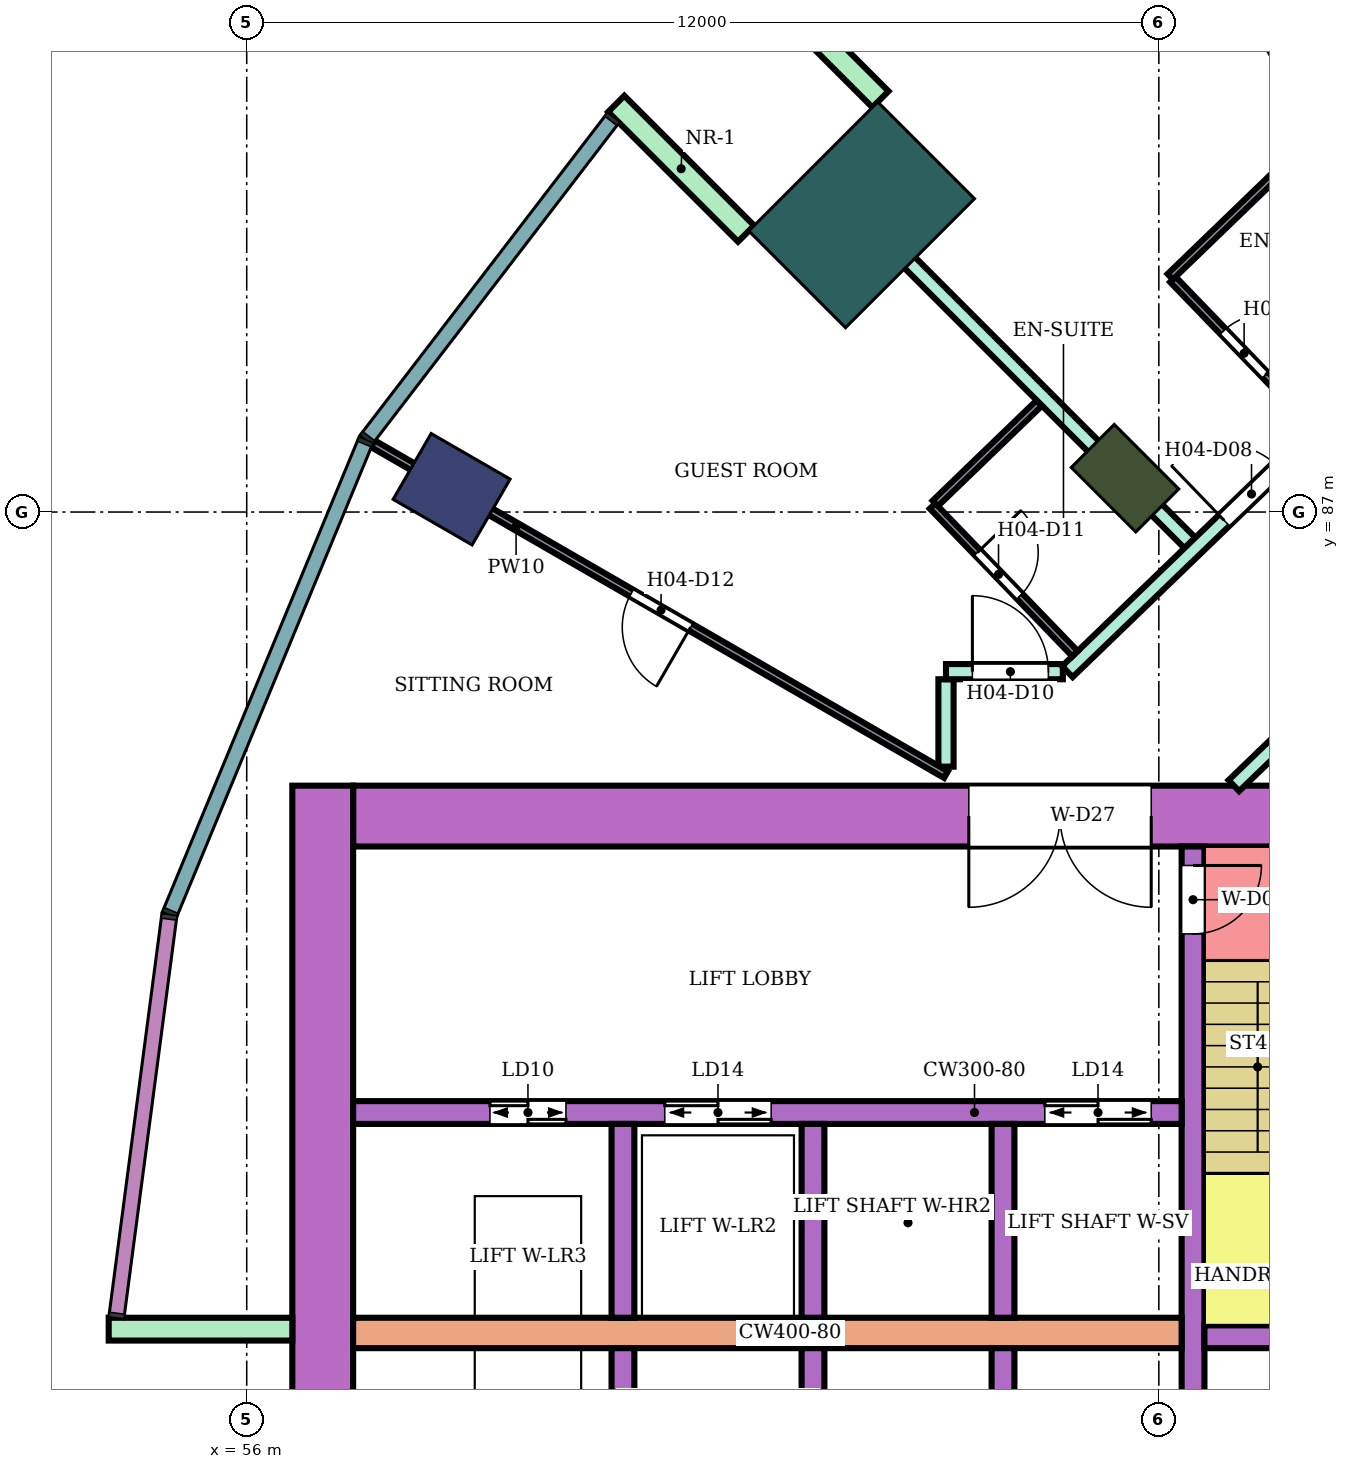
"""IFC4 building model, lengths in metres.
Left out: names, types, materials, properties, quantities, classifications, styles, units other than length and angle.
Written with IfcOpenShell. Run it as: python <this file> out.ifc"""

import sys

from ifc_helpers import new_model, si_unit, direction, frame, frame_2d, origin, origin_2d, place, context, subcontext, project, spatial, rectangle, extrude, element, fill, save


model = new_model("IFC4")
c1 = context("Model", 3, precision=1e-05, world=origin(), true_north=direction((0.0, 1.0)))
c2 = subcontext(c1, "Body", "Model", "MODEL_VIEW")
j1 = project(units=[si_unit("LENGTHUNIT", "METRE"), si_unit("PLANEANGLEUNIT", "RADIAN")], contexts=[c1])
p1 = place(None, origin())
s1 = spatial("IfcSite", under=j1, at=p1, CompositionType="ELEMENT")
p2 = place(p1, origin())
s2 = spatial("IfcBuilding", under=s1, at=p2, CompositionType="ELEMENT")
p3 = place(p2, frame((0.0, 0.0, 63.0)))
s3 = spatial("IfcBuildingStorey", under=s2, at=p3, CompositionType="ELEMENT", Elevation=63.0)
p4 = place(p3, frame((58.696, 87.3, 0.0), z_axis=(0.0, 0.0, 1.0), x_axis=(-0.866025403784, 0.5, 0.0)))
e1 = element("IfcColumn", 1, at=p4, inside=s3, PredefinedType="COLUMN", context=c2, shape_type="SweptSolid", body=[
    extrude(rectangle(XDim=1.2, YDim=1.0, at=origin_2d()), origin(), (0.0, 0.0, 1.0), 3.8),
])
p5 = place(p3, frame((67.555, 87.445, 0.0), z_axis=(0.0, 0.0, 1.0), x_axis=(-0.707106781187, 0.707106781187, 0.0)))
e2 = element("IfcColumn", 2, at=p5, inside=s3, PredefinedType="COLUMN", context=c2, shape_type="SweptSolid", body=[
    extrude(rectangle(XDim=1.2, YDim=0.8, at=origin_2d()), origin(), (0.0, 0.0, 1.0), 3.8),
])
p6 = place(p3, frame((64.09, 90.91, 0.0), z_axis=(0.0, 0.0, 1.0), x_axis=(-0.707106781187, 0.707106781187, 0.0)))
e3 = element("IfcColumn", 3, at=p6, inside=s3, PredefinedType="COLUMN", context=c2, shape_type="SweptSolid", body=[
    extrude(rectangle(XDim=1.8, YDim=2.4, at=origin_2d()), origin(), (0.0, 0.0, 1.0), 3.8),
])
p7 = place(p3, frame((72.1, 83.0, 0.0), z_axis=(0.0, 0.0, 1.0), x_axis=(-1.0, 0.0, 0.0)))
e4 = element("IfcWall", 4, at=p7, inside=s3, PredefinedType="SHEAR", context=c2, shape_type="SweptSolid", body=[
    extrude(rectangle(XDim=14.7, YDim=0.8, at=frame_2d((7.35, 0.0))), origin(), (0.0, 0.0, 1.0), 3.48),
])
p8 = place(p7, frame((4.2, 0.0, 0.0)))
e5 = element("IfcOpeningElement", 5, at=p8, cuts=e4, PredefinedType="OPENING", context=c2, shape_type="SweptSolid", body=[
    extrude(rectangle(XDim=2.4, YDim=2.4, at=frame_2d((1.2, 1.2))), frame((0.0, 0.41, 0.0), z_axis=(0.0, -1.0, 0.0), x_axis=(1.0, 0.0, 0.0)), (0.0, 0.0, 1.0), 0.82),
])
p9 = place(p3, frame((57.0, 83.4, 0.0), z_axis=(0.0, 0.0, 1.0), x_axis=(0.0, -1.0, 0.0)))
e6 = element("IfcWall", 6, at=p9, inside=s3, PredefinedType="SHEAR", context=c2, shape_type="SweptSolid", body=[
    extrude(rectangle(XDim=16.8, YDim=0.8, at=frame_2d((8.4, 0.0))), origin(), (0.0, 0.0, 1.0), 3.48),
])
p10 = place(p3, frame((68.45, 82.6, 0.0), z_axis=(0.0, 0.0, 1.0), x_axis=(0.0, -1.0, 0.0)))
e7 = element("IfcWall", 7, at=p10, inside=s3, PredefinedType="SHEAR", context=c2, shape_type="SweptSolid", body=[
    extrude(rectangle(XDim=7.6, YDim=0.3, at=frame_2d((3.8, 0.0))), origin(), (0.0, 0.0, 1.0), 3.48),
])
p11 = place(p10, frame((0.25, 0.0, 0.0)))
e8 = element("IfcOpeningElement", 8, at=p11, cuts=e7, PredefinedType="OPENING", context=c2, shape_type="SweptSolid", body=[
    extrude(rectangle(XDim=0.9, YDim=2.1, at=frame_2d((0.45, 1.05))), frame((0.0, 0.16, 0.0), z_axis=(0.0, -1.0, 0.0), x_axis=(1.0, 0.0, 0.0)), (0.0, 0.0, 1.0), 0.32),
])
p12 = place(p3, frame((71.65, 76.15, 0.0), z_axis=(0.0, 0.0, 1.0), x_axis=(-1.0, 0.0, 0.0)))
e9 = element("IfcWall", 9, at=p12, inside=s3, PredefinedType="SHEAR", context=c2, shape_type="SweptSolid", body=[
    extrude(rectangle(XDim=3.05, YDim=0.3, at=frame_2d((1.525, 0.0))), origin(), (0.0, 0.0, 1.0), 3.48),
])
p13 = place(p3, frame((68.3, 76.2, 0.0), z_axis=(0.0, 0.0, 1.0), x_axis=(-1.0, 0.0, 0.0)))
e10 = element("IfcWall", 10, at=p13, inside=s3, PredefinedType="SHEAR", context=c2, shape_type="SweptSolid", body=[
    extrude(rectangle(XDim=10.9, YDim=0.4, at=frame_2d((5.45, 0.0))), origin(), (0.0, 0.0, 1.0), 3.48),
])
p14 = place(p3, frame((68.3, 79.1, 0.0), z_axis=(0.0, 0.0, 1.0), x_axis=(-1.0, 0.0, 0.0)))
e11 = element("IfcWall", 11, at=p14, inside=s3, PredefinedType="SHEAR", context=c2, shape_type="SweptSolid", body=[
    extrude(rectangle(XDim=10.9, YDim=0.3, at=frame_2d((5.45, 0.0))), origin(), (0.0, 0.0, 1.0), 3.48),
])
p15 = place(p14, frame((0.4, 0.0, 0.0)))
e12 = element("IfcOpeningElement", 12, at=p15, cuts=e11, PredefinedType="OPENING", context=c2, shape_type="SweptSolid", body=[
    extrude(rectangle(XDim=1.4, YDim=2.1, at=frame_2d((0.7, 1.05))), frame((0.0, 0.16, 0.0), z_axis=(0.0, -1.0, 0.0), x_axis=(1.0, 0.0, 0.0)), (0.0, 0.0, 1.0), 0.32),
])
p16 = place(p14, frame((5.4, 0.0, 0.0)))
e13 = element("IfcOpeningElement", 13, at=p16, cuts=e11, PredefinedType="OPENING", context=c2, shape_type="SweptSolid", body=[
    extrude(rectangle(XDim=1.4, YDim=2.1, at=frame_2d((0.7, 1.05))), frame((0.0, 0.16, 0.0), z_axis=(0.0, -1.0, 0.0), x_axis=(1.0, 0.0, 0.0)), (0.0, 0.0, 1.0), 0.32),
])
p17 = place(p14, frame((8.1, 0.0, 0.0)))
e14 = element("IfcOpeningElement", 14, at=p17, cuts=e11, PredefinedType="OPENING", context=c2, shape_type="SweptSolid", body=[
    extrude(rectangle(XDim=1.0, YDim=2.1, at=frame_2d((0.5, 1.05))), frame((0.0, 0.16, 0.0), z_axis=(0.0, -1.0, 0.0), x_axis=(1.0, 0.0, 0.0)), (0.0, 0.0, 1.0), 0.32),
])
for number, where, z_axis, x_axis in (
    (15, (65.95, 76.0, 0.0), (0.0, 0.0, 1.0), (0.0, -1.0, 0.0)),
    (16, (63.45, 76.0, 0.0), (0.0, 0.0, 1.0), (0.0, -1.0, 0.0)),
    (17, (60.95, 76.0, 0.0), (0.0, 0.0, 1.0), (0.0, -1.0, 0.0)),
    (18, (65.95, 78.95, 0.0), (0.0, 0.0, 1.0), (0.0, -1.0, 0.0)),
    (19, (63.45, 78.95, 0.0), (0.0, 0.0, 1.0), (0.0, -1.0, 0.0)),
    (20, (60.95, 78.95, 0.0), (0.0, 0.0, 1.0), (0.0, -1.0, 0.0)),
):
    element("IfcWall", number, at=place(p3, frame(where, z_axis=z_axis, x_axis=x_axis)), inside=s3, PredefinedType="SHEAR", context=c2, shape_type="SweptSolid", body=[
        extrude(rectangle(XDim=2.55, YDim=0.3, at=frame_2d((1.275, 0.0))), origin(), (0.0, 0.0, 1.0), 3.48),
    ])
for number, where, z_axis, x_axis in (
    (21, (64.338, 92.43, 0.0), (0.0, 0.0, 1.0), (-0.707, 0.707, 0.0)),
    (22, (62.57, 90.662, 0.0), (0.0, 0.0, 1.0), (-0.707, 0.707, 0.0)),
    (23, (56.6, 76.25, 0.0), (0.0, 0.0, 1.0), (-1.0, 0.0, 0.0)),
):
    element("IfcWall", number, at=place(p3, frame(where, z_axis=z_axis, x_axis=x_axis)), inside=s3, PredefinedType="NOTDEFINED", context=c2, shape_type="SweptSolid", body=[
        extrude(rectangle(XDim=2.416, YDim=0.3, at=frame_2d((1.208, 0.0))), origin(), (0.0, 0.0, 1.0), 3.8),
    ])
p18 = place(p3, frame((63.598, 91.407, 0.0), z_axis=(0.0, 0.0, 1.0), x_axis=(0.706981202484, -0.707232337591, 0.0)))
e24 = element("IfcWall", 24, at=p18, inside=s3, PredefinedType="PARTITIONING", context=c2, shape_type="SweptSolid", body=[
    extrude(rectangle(XDim=6.805, YDim=0.2, at=frame_2d((3.402, 0.0))), origin(), (0.0, 0.0, 1.0), 3.35),
])
p19 = place(p3, frame((65.2, 83.65, 0.0), z_axis=(0.0, 0.0, 1.0), x_axis=(0.0, 1.0, 0.0)))
e25 = element("IfcWall", 25, at=p19, inside=s3, PredefinedType="PARTITIONING", context=c2, shape_type="SweptSolid", body=[
    extrude(rectangle(XDim=1.15, YDim=0.2, at=frame_2d((0.575, 0.0))), origin(), (0.0, 0.0, 1.0), 3.35),
])
p20 = place(p3, frame((65.2, 84.9, 0.0), z_axis=(0.0, 0.0, 1.0), x_axis=(1.0, 0.0, 0.0)))
e26 = element("IfcWall", 26, at=p20, inside=s3, PredefinedType="PARTITIONING", context=c2, shape_type="SweptSolid", body=[
    extrude(rectangle(XDim=1.537, YDim=0.2, at=frame_2d((0.769, 0.0))), origin(), (0.0, 0.0, 1.0), 3.35),
])
p21 = place(p20, frame((0.347, 0.0, 0.0)))
e27 = element("IfcOpeningElement", 27, at=p21, cuts=e26, PredefinedType="OPENING", context=c2, shape_type="SweptSolid", body=[
    extrude(rectangle(XDim=1.0, YDim=2.1, at=frame_2d((0.5, 1.05))), frame((0.0, 0.11, 0.0), z_axis=(0.0, -1.0, 0.0), x_axis=(1.0, 0.0, 0.0)), (0.0, 0.0, 1.0), 0.22),
])
p22 = place(p3, frame((66.797, 84.9, 0.0), z_axis=(0.0, 0.0, 1.0), x_axis=(0.719692092412, 0.694293376116, 0.0)))
e28 = element("IfcWall", 28, at=p22, inside=s3, PredefinedType="PARTITIONING", context=c2, shape_type="SweptSolid", body=[
    extrude(rectangle(XDim=6.584, YDim=0.2, at=frame_2d((3.292, 0.0))), origin(), (0.0, 0.0, 1.0), 3.35),
])
p23 = place(p22, frame((2.866, 0.0, 0.0)))
e29 = element("IfcOpeningElement", 29, at=p23, cuts=e28, PredefinedType="OPENING", context=c2, shape_type="SweptSolid", body=[
    extrude(rectangle(XDim=1.0, YDim=2.1, at=frame_2d((0.5, 1.05))), frame((0.0, 0.11, 0.0), z_axis=(0.0, -1.0, 0.0), x_axis=(1.0, 0.0, 0.0)), (0.0, 0.0, 1.0), 0.22),
])
p24 = place(p3, frame((67.101, 97.342, 0.0), z_axis=(0.0, 0.0, 1.0), x_axis=(0.499932813297, -0.866064190571, 0.0)))
e30 = element("IfcWall", 30, at=p24, inside=s3, PredefinedType="PARTITIONING", context=c2, shape_type="SweptSolid", body=[
    extrude(rectangle(XDim=8.908, YDim=0.2, at=frame_2d((4.454, 0.0))), origin(), (0.0, 0.0, 1.0), 3.35),
])
p25 = place(p3, frame((68.987, 83.4, 0.0), z_axis=(0.0, 0.0, 1.0), x_axis=(0.719591503389, 0.694397629784, 0.0)))
e31 = element("IfcWall", 31, at=p25, inside=s3, PredefinedType="PARTITIONING", context=c2, shape_type="SweptSolid", body=[
    extrude(rectangle(XDim=5.378, YDim=0.2, at=frame_2d((2.689, 0.0))), origin(), (0.0, 0.0, 1.0), 3.35),
])
p26 = place(p25, frame((3.938, 0.0, 0.0)))
e32 = element("IfcOpeningElement", 32, at=p26, cuts=e31, PredefinedType="OPENING", context=c2, shape_type="SweptSolid", body=[
    extrude(rectangle(XDim=1.0, YDim=2.1, at=frame_2d((0.5, 1.05))), frame((0.0, 0.11, 0.0), z_axis=(0.0, -1.0, 0.0), x_axis=(1.0, 0.0, 0.0)), (0.0, 0.0, 1.0), 0.22),
])
p27 = place(p3, frame((57.659, 87.899, 0.0), z_axis=(0.0, 0.0, 1.0), x_axis=(0.86602264145, -0.500004784474, 0.0)))
e33 = element("IfcWall", 33, at=p27, inside=s3, PredefinedType="PARTITIONING", context=c2, shape_type="SweptSolid", body=[
    extrude(rectangle(XDim=8.708, YDim=0.1, at=frame_2d((4.354, 0.0))), origin(), (0.0, 0.0, 1.0), 3.35),
])
p28 = place(p27, frame((3.929, 0.0, 0.0)))
e34 = element("IfcOpeningElement", 34, at=p28, cuts=e33, PredefinedType="OPENING", context=c2, shape_type="SweptSolid", body=[
    extrude(rectangle(XDim=0.9, YDim=2.1, at=frame_2d((0.45, 1.05))), frame((0.0, 0.06, 0.0), z_axis=(0.0, -1.0, 0.0), x_axis=(1.0, 0.0, 0.0)), (0.0, 0.0, 1.0), 0.12),
])
p29 = place(p3, frame((65.059, 87.114, 0.0), z_axis=(0.0, 0.0, 1.0), x_axis=(0.719715847356, 0.694268751324, 0.0)))
e35 = element("IfcWall", 35, at=p29, inside=s3, PredefinedType="PARTITIONING", context=c2, shape_type="SweptSolid", body=[
    extrude(rectangle(XDim=1.9, YDim=0.1, at=frame_2d((0.95, 0.0))), origin(), (0.0, 0.0, 1.0), 3.35),
])
p30 = place(p3, frame((65.023, 87.079, 0.0), z_axis=(0.0, 0.0, 1.0), x_axis=(0.694287838235, -0.719697434815, 0.0)))
e36 = element("IfcWall", 36, at=p30, inside=s3, PredefinedType="PARTITIONING", context=c2, shape_type="SweptSolid", body=[
    extrude(rectangle(XDim=2.7, YDim=0.1, at=frame_2d((1.35, 0.0))), origin(), (0.0, 0.0, 1.0), 3.35),
])
p31 = place(p30, frame((0.85, 0.0, 0.0)))
e37 = element("IfcOpeningElement", 37, at=p31, cuts=e36, PredefinedType="OPENING", context=c2, shape_type="SweptSolid", body=[
    extrude(rectangle(XDim=0.8, YDim=2.1, at=frame_2d((0.4, 1.05))), frame((0.0, 0.06, 0.0), z_axis=(0.0, -1.0, 0.0), x_axis=(1.0, 0.0, 0.0)), (0.0, 0.0, 1.0), 0.12),
])
p32 = place(p3, frame((68.185, 90.06, 0.0), z_axis=(0.0, 0.0, 1.0), x_axis=(0.69446127412, -0.719530081892, 0.0)))
e38 = element("IfcWall", 38, at=p32, inside=s3, PredefinedType="PARTITIONING", context=c2, shape_type="SweptSolid", body=[
    extrude(rectangle(XDim=2.649, YDim=0.1, at=frame_2d((1.324, 0.0))), origin(), (0.0, 0.0, 1.0), 3.35),
])
p33 = place(p32, frame((0.95, 0.0, 0.0)))
e39 = element("IfcOpeningElement", 39, at=p33, cuts=e38, PredefinedType="OPENING", context=c2, shape_type="SweptSolid", body=[
    extrude(rectangle(XDim=0.8, YDim=2.1, at=frame_2d((0.4, 1.05))), frame((0.0, 0.06, 0.0), z_axis=(0.0, -1.0, 0.0), x_axis=(1.0, 0.0, 0.0)), (0.0, 0.0, 1.0), 0.12),
])
p34 = place(p3, frame((68.15, 90.096, 0.0), z_axis=(0.0, 0.0, 1.0), x_axis=(0.719669144226, 0.694317163009, 0.0)))
e40 = element("IfcWall", 40, at=p34, inside=s3, PredefinedType="PARTITIONING", context=c2, shape_type="SweptSolid", body=[
    extrude(rectangle(XDim=2.687, YDim=0.1, at=frame_2d((1.343, 0.0))), origin(), (0.0, 0.0, 1.0), 3.35),
])
p35 = place(p23, origin())
e41 = element("IfcDoor", 41, at=p35, inside=s3, OperationType="SINGLE_SWING_LEFT", PredefinedType="DOOR", context=c2, shape_type="SweptSolid", body=[
    extrude(rectangle(XDim=1.0, YDim=2.1, at=frame_2d((0.5, 1.05))), frame((0.0, 0.025, 0.0), z_axis=(0.0, -1.0, 0.0), x_axis=(1.0, 0.0, 0.0)), (0.0, 0.0, 1.0), 0.05),
])
fill(e29, e41)
p36 = place(p33, origin())
e42 = element("IfcDoor", 42, at=p36, inside=s3, OperationType="SINGLE_SWING_RIGHT", PredefinedType="DOOR", context=c2, shape_type="SweptSolid", body=[
    extrude(rectangle(XDim=0.8, YDim=2.1, at=frame_2d((0.4, 1.05))), frame((0.0, 0.025, 0.0), z_axis=(0.0, -1.0, 0.0), x_axis=(1.0, 0.0, 0.0)), (0.0, 0.0, 1.0), 0.05),
])
fill(e39, e42)
p37 = place(p21, origin())
e43 = element("IfcDoor", 43, at=p37, inside=s3, OperationType="SINGLE_SWING_LEFT", PredefinedType="DOOR", context=c2, shape_type="SweptSolid", body=[
    extrude(rectangle(XDim=1.0, YDim=2.1, at=frame_2d((0.5, 1.05))), frame((0.0, 0.025, 0.0), z_axis=(0.0, -1.0, 0.0), x_axis=(1.0, 0.0, 0.0)), (0.0, 0.0, 1.0), 0.05),
])
fill(e27, e43)
p38 = place(p31, origin())
e44 = element("IfcDoor", 44, at=p38, inside=s3, OperationType="SINGLE_SWING_LEFT", PredefinedType="DOOR", context=c2, shape_type="SweptSolid", body=[
    extrude(rectangle(XDim=0.8, YDim=2.1, at=frame_2d((0.4, 1.05))), frame((0.0, 0.025, 0.0), z_axis=(0.0, -1.0, 0.0), x_axis=(1.0, 0.0, 0.0)), (0.0, 0.0, 1.0), 0.05),
])
fill(e37, e44)
p39 = place(p28, frame((0.9, 0.0, 0.0), z_axis=(0.0, 0.0, 1.0), x_axis=(-1.0, 0.0, 0.0)))
e45 = element("IfcDoor", 45, at=p39, inside=s3, OperationType="SINGLE_SWING_LEFT", PredefinedType="DOOR", context=c2, shape_type="SweptSolid", body=[
    extrude(rectangle(XDim=0.9, YDim=2.1, at=frame_2d((0.45, 1.05))), frame((0.0, 0.025, 0.0), z_axis=(0.0, -1.0, 0.0), x_axis=(1.0, 0.0, 0.0)), (0.0, 0.0, 1.0), 0.05),
])
fill(e34, e45)
p40 = place(p11, origin())
e46 = element("IfcDoor", 46, at=p40, inside=s3, OperationType="SINGLE_SWING_LEFT", PredefinedType="DOOR", context=c2, shape_type="SweptSolid", body=[
    extrude(rectangle(XDim=0.9, YDim=2.1, at=frame_2d((0.45, 1.05))), frame((0.0, 0.025, 0.0), z_axis=(0.0, -1.0, 0.0), x_axis=(1.0, 0.0, 0.0)), (0.0, 0.0, 1.0), 0.05),
])
fill(e8, e46)
p41 = place(p15, origin())
e47 = element("IfcDoor", 47, at=p41, inside=s3, OperationType="DOUBLE_DOOR_SLIDING", PredefinedType="DOOR", context=c2, shape_type="SweptSolid", body=[
    extrude(rectangle(XDim=1.4, YDim=2.1, at=frame_2d((0.7, 1.05))), frame((0.0, 0.025, 0.0), z_axis=(0.0, -1.0, 0.0), x_axis=(1.0, 0.0, 0.0)), (0.0, 0.0, 1.0), 0.05),
])
fill(e12, e47)
p42 = place(p16, origin())
e48 = element("IfcDoor", 48, at=p42, inside=s3, OperationType="DOUBLE_DOOR_SLIDING", PredefinedType="DOOR", context=c2, shape_type="SweptSolid", body=[
    extrude(rectangle(XDim=1.4, YDim=2.1, at=frame_2d((0.7, 1.05))), frame((0.0, 0.025, 0.0), z_axis=(0.0, -1.0, 0.0), x_axis=(1.0, 0.0, 0.0)), (0.0, 0.0, 1.0), 0.05),
])
fill(e13, e48)
p43 = place(p17, origin())
e49 = element("IfcDoor", 49, at=p43, inside=s3, OperationType="DOUBLE_DOOR_SLIDING", PredefinedType="DOOR", context=c2, shape_type="SweptSolid", body=[
    extrude(rectangle(XDim=1.0, YDim=2.1, at=frame_2d((0.5, 1.05))), frame((0.0, 0.025, 0.0), z_axis=(0.0, -1.0, 0.0), x_axis=(1.0, 0.0, 0.0)), (0.0, 0.0, 1.0), 0.05),
])
fill(e14, e49)
p44 = place(p8, origin())
e50 = element("IfcDoor", 50, at=p44, inside=s3, OperationType="DOUBLE_DOOR_SINGLE_SWING", PredefinedType="DOOR", context=c2, shape_type="SweptSolid", body=[
    extrude(rectangle(XDim=2.4, YDim=2.4, at=frame_2d((1.2, 1.2))), frame((0.0, 0.025, 0.0), z_axis=(0.0, -1.0, 0.0), x_axis=(1.0, 0.0, 0.0)), (0.0, 0.0, 1.0), 0.05),
])
fill(e5, e50)
save(model, sys.argv[1])
